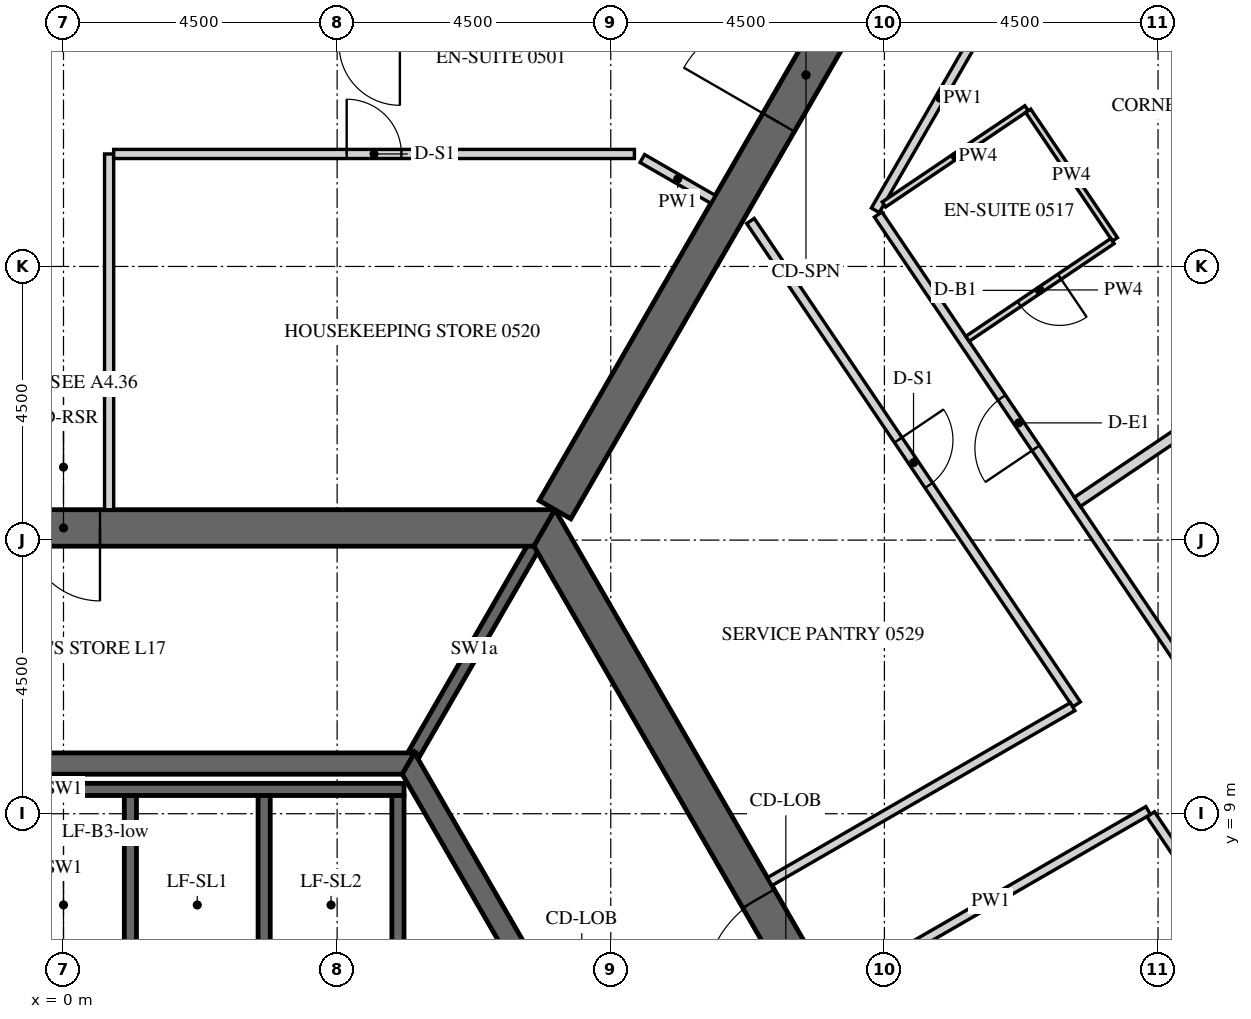
"""IFC4 building model, lengths in metres.
Left out: names, types, materials, properties, quantities, classifications, styles, units other than length and angle.
Written with IfcOpenShell. Run it as: python <this file> out.ifc"""

import sys

from ifc_helpers import new_model, si_unit, direction, frame, frame_2d, origin, place, context, subcontext, project, spatial, polyline, rectangle, outline, extrude, element, fill, save


model = new_model("IFC4")
c1 = context("Model", 3, precision=1e-05, world=origin(), true_north=direction((0.0, 1.0)))
c2 = subcontext(c1, "Body", "Model", "MODEL_VIEW")
j1 = project(units=[si_unit("LENGTHUNIT", "METRE"), si_unit("PLANEANGLEUNIT", "RADIAN")], contexts=[c1])
p1 = place(None, origin())
s1 = spatial("IfcSite", under=j1, at=p1, CompositionType="ELEMENT")
p2 = place(p1, origin())
s2 = spatial("IfcBuilding", under=s1, at=p2, CompositionType="ELEMENT")
p3 = place(p2, frame((0.0, 0.0, 80.4)))
s3 = spatial("IfcBuildingStorey", under=s2, at=p3, CompositionType="ELEMENT", Elevation=80.4)
p4 = place(p3, frame((33.728, 3.153, -0.15), z_axis=(0.0, 0.0, 1.0), x_axis=(-0.559192411416, 0.82903790445, 0.0)))
e1 = element("IfcWall", 1, at=p4, inside=s3, PredefinedType="SOLIDWALL", context=c2, shape_type="SweptSolid", body=[
    extrude(outline(polyline([(-0.026, -0.275), (30.093, -0.275), (30.048, 0.275), (0.026, 0.275), (-0.026, -0.275)])), origin(), (0.0, 0.0, 1.0), 3.9),
])
p5 = place(p4, frame((1.236, 0.0, 1.05)))
e2 = element("IfcOpeningElement", 2, at=p5, cuts=e1, PredefinedType="OPENING", context=c2, shape_type="SweptSolid", body=[
    extrude(rectangle(XDim=2.4, YDim=2.4, at=frame_2d((1.2, 1.2))), frame((0.0, 0.285, 0.0), z_axis=(0.0, -1.0, 0.0), x_axis=(1.0, 0.0, 0.0)), (0.0, 0.0, 1.0), 0.57),
])
p6 = place(p4, frame((4.835, 0.0, 1.05)))
e3 = element("IfcOpeningElement", 3, at=p6, cuts=e1, PredefinedType="OPENING", context=c2, shape_type="SweptSolid", body=[
    extrude(rectangle(XDim=2.4, YDim=2.4, at=frame_2d((1.2, 1.2))), frame((0.0, 0.285, 0.0), z_axis=(0.0, -1.0, 0.0), x_axis=(1.0, 0.0, 0.0)), (0.0, 0.0, 1.0), 0.57),
])
p7 = place(p4, frame((8.436, 0.0, 1.05)))
e4 = element("IfcOpeningElement", 4, at=p7, cuts=e1, PredefinedType="OPENING", context=c2, shape_type="SweptSolid", body=[
    extrude(rectangle(XDim=2.4, YDim=2.4, at=frame_2d((1.2, 1.2))), frame((0.0, 0.285, 0.0), z_axis=(0.0, -1.0, 0.0), x_axis=(1.0, 0.0, 0.0)), (0.0, 0.0, 1.0), 0.57),
])
p8 = place(p4, frame((12.035, 0.0, 1.05)))
e5 = element("IfcOpeningElement", 5, at=p8, cuts=e1, PredefinedType="OPENING", context=c2, shape_type="SweptSolid", body=[
    extrude(rectangle(XDim=2.4, YDim=2.4, at=frame_2d((1.2, 1.2))), frame((0.0, 0.285, 0.0), z_axis=(0.0, -1.0, 0.0), x_axis=(1.0, 0.0, 0.0)), (0.0, 0.0, 1.0), 0.57),
])
p9 = place(p4, frame((15.635, 0.0, 1.05)))
e6 = element("IfcOpeningElement", 6, at=p9, cuts=e1, PredefinedType="OPENING", context=c2, shape_type="SweptSolid", body=[
    extrude(rectangle(XDim=2.4, YDim=2.4, at=frame_2d((1.2, 1.2))), frame((0.0, 0.285, 0.0), z_axis=(0.0, -1.0, 0.0), x_axis=(1.0, 0.0, 0.0)), (0.0, 0.0, 1.0), 0.57),
])
p10 = place(p4, frame((19.236, 0.0, 1.05)))
e7 = element("IfcOpeningElement", 7, at=p10, cuts=e1, PredefinedType="OPENING", context=c2, shape_type="SweptSolid", body=[
    extrude(rectangle(XDim=2.4, YDim=2.4, at=frame_2d((1.2, 1.2))), frame((0.0, 0.285, 0.0), z_axis=(0.0, -1.0, 0.0), x_axis=(1.0, 0.0, 0.0)), (0.0, 0.0, 1.0), 0.57),
])
p11 = place(p4, frame((22.835, 0.0, 1.05)))
e8 = element("IfcOpeningElement", 8, at=p11, cuts=e1, PredefinedType="OPENING", context=c2, shape_type="SweptSolid", body=[
    extrude(rectangle(XDim=2.4, YDim=2.4, at=frame_2d((1.2, 1.2))), frame((0.0, 0.285, 0.0), z_axis=(0.0, -1.0, 0.0), x_axis=(1.0, 0.0, 0.0)), (0.0, 0.0, 1.0), 0.57),
])
p12 = place(p4, frame((26.436, 0.0, 1.05)))
e9 = element("IfcOpeningElement", 9, at=p12, cuts=e1, PredefinedType="OPENING", context=c2, shape_type="SweptSolid", body=[
    extrude(rectangle(XDim=2.4, YDim=2.4, at=frame_2d((1.2, 1.2))), frame((0.0, 0.285, 0.0), z_axis=(0.0, -1.0, 0.0), x_axis=(1.0, 0.0, 0.0)), (0.0, 0.0, 1.0), 0.57),
])
p13 = place(p3, frame((15.819, 0.0, -0.15), z_axis=(0.0, 0.0, 1.0), x_axis=(-0.499999880136, 0.866025472988, 0.0)))
e10 = element("IfcWall", 10, at=p13, inside=s3, PredefinedType="SHEAR", context=c2, shape_type="SweptSolid", body=[
    extrude(outline(polyline([(-0.173, -0.3), (15.993, -0.3), (15.646, 0.3), (0.173, 0.3), (-0.173, -0.3)])), origin(), (0.0, 0.0, 1.0), 3.9),
])
p14 = place(p13, frame((6.981, 0.0, 0.15)))
e11 = element("IfcOpeningElement", 11, at=p14, cuts=e10, PredefinedType="OPENING", context=c2, shape_type="SweptSolid", body=[
    extrude(rectangle(XDim=1.8, YDim=2.4, at=frame_2d((0.9, 1.2))), frame((0.0, 0.31, 0.0), z_axis=(0.0, -1.0, 0.0), x_axis=(1.0, 0.0, 0.0)), (0.0, 0.0, 1.0), 0.62),
])
p15 = place(p3, frame((7.91, 13.7, -0.15), z_axis=(0.0, 0.0, 1.0), x_axis=(-1.0, 0.0, 0.0)))
e12 = element("IfcWall", 12, at=p15, inside=s3, PredefinedType="SHEAR", context=c2, shape_type="SweptSolid", body=[
    extrude(outline(polyline([(-0.173, -0.3), (15.993, -0.3), (15.646, 0.3), (0.173, 0.3), (-0.173, -0.3)])), origin(), (0.0, 0.0, 1.0), 3.9),
])
p16 = place(p15, frame((7.31, 0.0, 0.15)))
e13 = element("IfcOpeningElement", 13, at=p16, cuts=e12, PredefinedType="OPENING", context=c2, shape_type="SweptSolid", body=[
    extrude(rectangle(XDim=1.2, YDim=2.4, at=frame_2d((0.6, 1.2))), frame((0.0, 0.31, 0.0), z_axis=(0.0, -1.0, 0.0), x_axis=(1.0, 0.0, 0.0)), (0.0, 0.0, 1.0), 0.62),
])
p17 = place(p3, frame((8.083, 14.0, -0.15), z_axis=(0.0, 0.0, 1.0), x_axis=(0.499997680643, 0.866026742862, 0.0)))
e14 = element("IfcWall", 14, at=p17, inside=s3, PredefinedType="SHEAR", context=c2, shape_type="SweptSolid", body=[
    extrude(rectangle(XDim=16.509, YDim=0.6, at=frame_2d((8.254, 0.0))), origin(), (0.0, 0.0, 1.0), 3.9),
])
p18 = place(p17, frame((7.354, 0.0, 0.15)))
e15 = element("IfcOpeningElement", 15, at=p18, cuts=e14, PredefinedType="OPENING", context=c2, shape_type="SweptSolid", body=[
    extrude(rectangle(XDim=1.8, YDim=2.4, at=frame_2d((0.9, 1.2))), frame((0.0, 0.31, 0.0), z_axis=(0.0, -1.0, 0.0), x_axis=(1.0, 0.0, 0.0)), (0.0, 0.0, 1.0), 0.62),
])
p19 = place(p3, frame((11.345, 0.0, -0.15), z_axis=(0.0, 0.0, 1.0), x_axis=(-0.499995046907, 0.866028263435, 0.0)))
e16 = element("IfcWall", 16, at=p19, inside=s3, PredefinedType="SHEAR", context=c2, shape_type="SweptSolid", body=[
    extrude(outline(polyline([(-0.101, -0.175), (11.446, -0.175), (11.244, 0.175), (0.101, 0.175), (-0.101, -0.175)])), origin(), (0.0, 0.0, 1.0), 3.9),
])
p20 = place(p19, frame((4.744, 0.0, 0.15)))
e17 = element("IfcOpeningElement", 17, at=p20, cuts=e16, PredefinedType="OPENING", context=c2, shape_type="SweptSolid", body=[
    extrude(rectangle(XDim=1.8, YDim=2.4, at=frame_2d((0.9, 1.2))), frame((0.0, 0.185, 0.0), z_axis=(0.0, -1.0, 0.0), x_axis=(1.0, 0.0, 0.0)), (0.0, 0.0, 1.0), 0.37),
])
p21 = place(p3, frame((5.673, 9.825, -0.15), z_axis=(0.0, 0.0, 1.0), x_axis=(-1.0, 0.0, 0.0)))
e18 = element("IfcWall", 18, at=p21, inside=s3, PredefinedType="SHEAR", context=c2, shape_type="SweptSolid", body=[
    extrude(outline(polyline([(-0.101, -0.175), (11.446, -0.175), (11.244, 0.175), (0.101, 0.175), (-0.101, -0.175)])), origin(), (0.0, 0.0, 1.0), 3.9),
])
p22 = place(p3, frame((-5.6, 9.4, -0.25), z_axis=(0.0, 0.0, 1.0), x_axis=(1.0, 0.0, 0.0)))
e19 = element("IfcWall", 19, at=p22, inside=s3, PredefinedType="SHEAR", context=c2, shape_type="SweptSolid", body=[
    extrude(rectangle(XDim=11.2, YDim=0.2, at=frame_2d((5.6, 0.0))), origin(), (0.0, 0.0, 1.0), 3.9),
])
for number, where, z_axis, x_axis in (
    (20, (1.1, 6.4, -0.25), (0.0, 0.0, 1.0), (0.0, 1.0, 0.0)),
    (21, (3.3, 6.4, -0.25), (0.0, 0.0, 1.0), (0.0, 1.0, 0.0)),
    (22, (5.5, 6.4, -0.25), (0.0, 0.0, 1.0), (0.0, 1.0, 0.0)),
):
    element("IfcWall", number, at=place(p3, frame(where, z_axis=z_axis, x_axis=x_axis)), inside=s3, PredefinedType="SHEAR", context=c2, shape_type="SweptSolid", body=[
        extrude(rectangle(XDim=2.9, YDim=0.2, at=frame_2d((1.45, 0.0))), origin(), (0.0, 0.0, 1.0), 3.9),
    ])
p23 = place(p3, frame((5.773, 10.0, -0.15), z_axis=(0.0, 0.0, 1.0), x_axis=(0.500038251005, 0.86600331843, 0.0)))
e23 = element("IfcWall", 23, at=p23, inside=s3, PredefinedType="SHEAR", context=c2, shape_type="SweptSolid", body=[
    extrude(rectangle(XDim=3.926, YDim=0.2, at=frame_2d((1.963, 0.0))), origin(), (0.0, 0.0, 1.0), 3.9),
])
p24 = place(p3, frame((0.75, 14.0, 0.0), z_axis=(0.0, 0.0, 1.0), x_axis=(0.0, 1.0, 0.0)))
e24 = element("IfcWall", 24, at=p24, inside=s3, PredefinedType="PARTITIONING", context=c2, shape_type="SweptSolid", body=[
    extrude(rectangle(XDim=5.85, YDim=0.15, at=frame_2d((2.925, 0.0))), origin(), (0.0, 0.0, 1.0), 2.988),
])
p25 = place(p3, frame((0.825, 19.85, 0.0), z_axis=(0.0, 0.0, 1.0), x_axis=(1.0, 0.0, 0.0)))
e25 = element("IfcWall", 25, at=p25, inside=s3, PredefinedType="PARTITIONING", context=c2, shape_type="SweptSolid", body=[
    extrude(rectangle(XDim=8.564, YDim=0.15, at=frame_2d((4.282, 0.0))), origin(), (0.0, 0.0, 1.0), 2.988),
])
p26 = place(p25, frame((3.832, 0.0, 0.0)))
e26 = element("IfcOpeningElement", 26, at=p26, cuts=e25, PredefinedType="OPENING", context=c2, shape_type="SweptSolid", body=[
    extrude(rectangle(XDim=0.9, YDim=2.1, at=frame_2d((0.45, 1.05))), frame((0.0, 0.085, 0.0), z_axis=(0.0, -1.0, 0.0), x_axis=(1.0, 0.0, 0.0)), (0.0, 0.0, 1.0), 0.17),
])
p27 = place(p3, frame((9.519, 19.775, 0.0), z_axis=(0.0, 0.0, 1.0), x_axis=(0.866043397086, -0.499968833392, 0.0)))
e27 = element("IfcWall", 27, at=p27, inside=s3, PredefinedType="PARTITIONING", context=c2, shape_type="SweptSolid", body=[
    extrude(rectangle(XDim=1.344, YDim=0.15, at=frame_2d((0.672, 0.0))), origin(), (0.0, 0.0, 1.0), 2.988),
])
p28 = place(p3, frame((25.467, 0.96, 0.0), z_axis=(0.0, 0.0, 1.0), x_axis=(-0.559192112521, 0.829038106057, 0.0)))
e28 = element("IfcWall", 28, at=p28, inside=s3, PredefinedType="PARTITIONING", context=c2, shape_type="SweptSolid", body=[
    extrude(rectangle(XDim=21.584, YDim=0.15, at=frame_2d((10.792, 0.0))), origin(), (0.0, 0.0, 1.0), 2.988),
])
p29 = place(p28, frame((0.184, 0.0, 0.0)))
e29 = element("IfcOpeningElement", 29, at=p29, cuts=e28, PredefinedType="OPENING", context=c2, shape_type="SweptSolid", body=[
    extrude(rectangle(XDim=1.0, YDim=2.1, at=frame_2d((0.5, 1.05))), frame((0.0, 0.085, 0.0), z_axis=(0.0, -1.0, 0.0), x_axis=(1.0, 0.0, 0.0)), (0.0, 0.0, 1.0), 0.17),
])
p30 = place(p28, frame((9.434, 0.0, 0.0)))
e30 = element("IfcOpeningElement", 30, at=p30, cuts=e28, PredefinedType="OPENING", context=c2, shape_type="SweptSolid", body=[
    extrude(rectangle(XDim=1.0, YDim=2.1, at=frame_2d((0.5, 1.05))), frame((0.0, 0.085, 0.0), z_axis=(0.0, -1.0, 0.0), x_axis=(1.0, 0.0, 0.0)), (0.0, 0.0, 1.0), 0.17),
])
p31 = place(p28, frame((16.951, 0.0, 0.0)))
e31 = element("IfcOpeningElement", 31, at=p31, cuts=e28, PredefinedType="OPENING", context=c2, shape_type="SweptSolid", body=[
    extrude(rectangle(XDim=1.0, YDim=2.1, at=frame_2d((0.5, 1.05))), frame((0.0, 0.085, 0.0), z_axis=(0.0, -1.0, 0.0), x_axis=(1.0, 0.0, 0.0)), (0.0, 0.0, 1.0), 0.17),
])
p32 = place(p3, frame((13.35, 18.924, 0.0), z_axis=(0.0, 0.0, 1.0), x_axis=(0.500000470374, 0.866025132214, 0.0)))
e32 = element("IfcWall", 32, at=p32, inside=s3, PredefinedType="PARTITIONING", context=c2, shape_type="SweptSolid", body=[
    extrude(rectangle(XDim=4.257, YDim=0.15, at=frame_2d((2.128, 0.0))), origin(), (0.0, 0.0, 1.0), 2.988),
])
p33 = place(p3, frame((12.664, 6.066, 0.0), z_axis=(0.0, 0.0, 1.0), x_axis=(0.866018848283, 0.500011354289, 0.0)))
e33 = element("IfcWall", 33, at=p33, inside=s3, PredefinedType="PARTITIONING", context=c2, shape_type="SweptSolid", body=[
    extrude(rectangle(XDim=5.974, YDim=0.15, at=frame_2d((2.987, 0.0))), origin(), (0.0, 0.0, 1.0), 2.988),
])
p34 = place(p3, frame((17.879, 8.99, 0.0), z_axis=(0.0, 0.0, 1.0), x_axis=(0.559189565351, -0.829039824136, 0.0)))
e34 = element("IfcWall", 34, at=p34, inside=s3, PredefinedType="PARTITIONING", context=c2, shape_type="SweptSolid", body=[
    extrude(rectangle(XDim=9.859, YDim=0.15, at=frame_2d((4.929, 0.0))), origin(), (0.0, 0.0, 1.0), 2.988),
])
p35 = place(p34, frame((4.479, 0.0, 0.0)))
e35 = element("IfcOpeningElement", 35, at=p35, cuts=e34, PredefinedType="OPENING", context=c2, shape_type="SweptSolid", body=[
    extrude(rectangle(XDim=0.9, YDim=2.1, at=frame_2d((0.45, 1.05))), frame((0.0, 0.085, 0.0), z_axis=(0.0, -1.0, 0.0), x_axis=(1.0, 0.0, 0.0)), (0.0, 0.0, 1.0), 0.17),
])
p36 = place(p3, frame((11.298, 18.748, 0.0), z_axis=(0.0, 0.0, 1.0), x_axis=(0.559198234291, -0.829033976847, 0.0)))
e36 = element("IfcWall", 36, at=p36, inside=s3, PredefinedType="PARTITIONING", context=c2, shape_type="SweptSolid", body=[
    extrude(rectangle(XDim=9.59, YDim=0.15, at=frame_2d((4.795, 0.0))), origin(), (0.0, 0.0, 1.0), 2.988),
])
p37 = place(p36, frame((4.345, 0.0, 0.0)))
e37 = element("IfcOpeningElement", 37, at=p37, cuts=e36, PredefinedType="OPENING", context=c2, shape_type="SweptSolid", body=[
    extrude(rectangle(XDim=0.9, YDim=2.1, at=frame_2d((0.45, 1.05))), frame((0.0, 0.085, 0.0), z_axis=(0.0, -1.0, 0.0), x_axis=(1.0, 0.0, 0.0)), (0.0, 0.0, 1.0), 0.17),
])
p38 = place(p3, frame((16.595, 10.76, 0.0), z_axis=(0.0, 0.0, 1.0), x_axis=(-0.866019477104, -0.500010265171, 0.0)))
e38 = element("IfcWall", 38, at=p38, inside=s3, PredefinedType="PARTITIONING", context=c2, shape_type="SweptSolid", body=[
    extrude(rectangle(XDim=5.752, YDim=0.15, at=frame_2d((2.876, 0.0))), origin(), (0.0, 0.0, 1.0), 2.988),
])
p39 = place(p3, frame((23.079, 18.449, 0.0), z_axis=(0.0, 0.0, 1.0), x_axis=(-0.82903328576, -0.559199258853, 0.0)))
e39 = element("IfcWall", 39, at=p39, inside=s3, PredefinedType="PARTITIONING", context=c2, shape_type="SweptSolid", body=[
    extrude(rectangle(XDim=7.725, YDim=0.18, at=frame_2d((3.863, 0.0))), origin(), (0.0, 0.0, 1.0), 2.988),
])
p40 = place(p3, frame((13.492, 19.019, 0.0), z_axis=(0.0, 0.0, 1.0), x_axis=(0.829037705426, 0.559192706481, 0.0)))
e40 = element("IfcWall", 40, at=p40, inside=s3, PredefinedType="PARTITIONING", context=c2, shape_type="SweptSolid", body=[
    extrude(rectangle(XDim=2.829, YDim=0.1, at=frame_2d((1.415, 0.0))), origin(), (0.0, 0.0, 1.0), 2.988),
])
p41 = place(p3, frame((15.865, 20.56, 0.0), z_axis=(0.0, 0.0, 1.0), x_axis=(0.559221247909, -0.829018453285, 0.0)))
e41 = element("IfcWall", 41, at=p41, inside=s3, PredefinedType="PARTITIONING", context=c2, shape_type="SweptSolid", body=[
    extrude(rectangle(XDim=2.55, YDim=0.1, at=frame_2d((1.275, 0.0))), origin(), (0.0, 0.0, 1.0), 2.988),
])
p42 = place(p3, frame((17.25, 18.418, 0.0), z_axis=(0.0, 0.0, 1.0), x_axis=(-0.82904649496, -0.559179675234, 0.0)))
e42 = element("IfcWall", 42, at=p42, inside=s3, PredefinedType="PARTITIONING", context=c2, shape_type="SweptSolid", body=[
    extrude(rectangle(XDim=2.875, YDim=0.1, at=frame_2d((1.438, 0.0))), origin(), (0.0, 0.0, 1.0), 2.988),
])
p43 = place(p42, frame((1.05, 0.0, 0.0)))
e43 = element("IfcOpeningElement", 43, at=p43, cuts=e42, PredefinedType="OPENING", context=c2, shape_type="SweptSolid", body=[
    extrude(rectangle(XDim=0.8, YDim=2.1, at=frame_2d((0.4, 1.05))), frame((0.0, 0.06, 0.0), z_axis=(0.0, -1.0, 0.0), x_axis=(1.0, 0.0, 0.0)), (0.0, 0.0, 1.0), 0.12),
])
p44 = place(p14, origin())
e44 = element("IfcDoor", 44, at=p44, inside=s3, OperationType="DOUBLE_DOOR_SINGLE_SWING", PredefinedType="DOOR", context=c2, shape_type="SweptSolid", body=[
    extrude(rectangle(XDim=1.8, YDim=2.4, at=frame_2d((0.9, 1.2))), frame((0.0, 0.025, 0.0), z_axis=(0.0, -1.0, 0.0), x_axis=(1.0, 0.0, 0.0)), (0.0, 0.0, 1.0), 0.05),
])
fill(e11, e44)
p45 = place(p16, origin())
e45 = element("IfcDoor", 45, at=p45, inside=s3, OperationType="SINGLE_SWING_LEFT", PredefinedType="DOOR", context=c2, shape_type="SweptSolid", body=[
    extrude(rectangle(XDim=1.2, YDim=2.4, at=frame_2d((0.6, 1.2))), frame((0.0, 0.025, 0.0), z_axis=(0.0, -1.0, 0.0), x_axis=(1.0, 0.0, 0.0)), (0.0, 0.0, 1.0), 0.05),
])
fill(e13, e45)
p46 = place(p18, origin())
e46 = element("IfcDoor", 46, at=p46, inside=s3, OperationType="DOUBLE_DOOR_SINGLE_SWING", PredefinedType="DOOR", context=c2, shape_type="SweptSolid", body=[
    extrude(rectangle(XDim=1.8, YDim=2.4, at=frame_2d((0.9, 1.2))), frame((0.0, 0.025, 0.0), z_axis=(0.0, -1.0, 0.0), x_axis=(1.0, 0.0, 0.0)), (0.0, 0.0, 1.0), 0.05),
])
fill(e15, e46)
p47 = place(p31, origin())
e47 = element("IfcDoor", 47, at=p47, inside=s3, OperationType="SINGLE_SWING_RIGHT", PredefinedType="DOOR", context=c2, shape_type="SweptSolid", body=[
    extrude(rectangle(XDim=1.0, YDim=2.1, at=frame_2d((0.5, 1.05))), frame((0.0, 0.025, 0.0), z_axis=(0.0, -1.0, 0.0), x_axis=(1.0, 0.0, 0.0)), (0.0, 0.0, 1.0), 0.05),
])
fill(e31, e47)
p48 = place(p43, origin())
e48 = element("IfcDoor", 48, at=p48, inside=s3, OperationType="SINGLE_SWING_LEFT", PredefinedType="DOOR", context=c2, shape_type="SweptSolid", body=[
    extrude(rectangle(XDim=0.8, YDim=2.1, at=frame_2d((0.4, 1.05))), frame((0.0, 0.025, 0.0), z_axis=(0.0, -1.0, 0.0), x_axis=(1.0, 0.0, 0.0)), (0.0, 0.0, 1.0), 0.05),
])
fill(e43, e48)
p49 = place(p26, origin())
e49 = element("IfcDoor", 49, at=p49, inside=s3, OperationType="SINGLE_SWING_RIGHT", PredefinedType="DOOR", context=c2, shape_type="SweptSolid", body=[
    extrude(rectangle(XDim=0.9, YDim=2.1, at=frame_2d((0.45, 1.05))), frame((0.0, 0.025, 0.0), z_axis=(0.0, -1.0, 0.0), x_axis=(1.0, 0.0, 0.0)), (0.0, 0.0, 1.0), 0.05),
])
fill(e26, e49)
p50 = place(p37, origin())
e50 = element("IfcDoor", 50, at=p50, inside=s3, OperationType="SINGLE_SWING_RIGHT", PredefinedType="DOOR", context=c2, shape_type="SweptSolid", body=[
    extrude(rectangle(XDim=0.9, YDim=2.1, at=frame_2d((0.45, 1.05))), frame((0.0, 0.025, 0.0), z_axis=(0.0, -1.0, 0.0), x_axis=(1.0, 0.0, 0.0)), (0.0, 0.0, 1.0), 0.05),
])
fill(e37, e50)
save(model, sys.argv[1])
